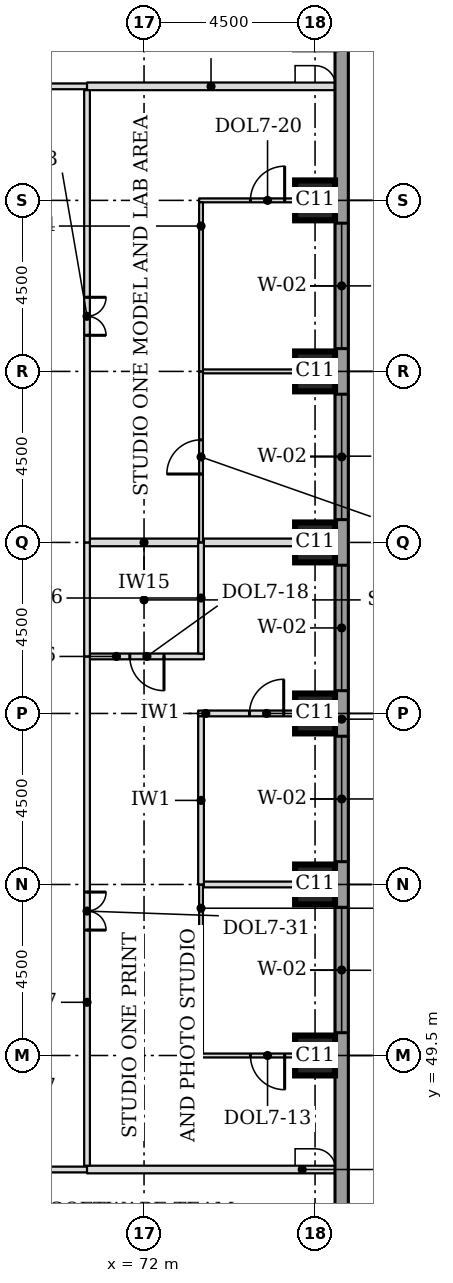
"""IFC4 building model, lengths in metres.
Left out: names, types, materials, properties, quantities, classifications, styles, units other than length and angle.
Written with IfcOpenShell. Run it as: python <this file> out.ifc"""

import sys

from ifc_helpers import new_model, si_unit, direction, frame, frame_2d, origin, origin_2d, place, context, subcontext, project, spatial, rectangle, extrude, element, fill, save


model = new_model("IFC4")
c1 = context("Model", 3, precision=1e-05, world=origin(), true_north=direction((0.0, 1.0)))
c2 = subcontext(c1, "Body", "Model", "MODEL_VIEW")
j1 = project(units=[si_unit("LENGTHUNIT", "METRE"), si_unit("PLANEANGLEUNIT", "RADIAN")], contexts=[c1])
p1 = place(None, origin())
s1 = spatial("IfcSite", under=j1, at=p1, CompositionType="ELEMENT")
p2 = place(p1, origin())
s2 = spatial("IfcBuilding", under=s1, at=p2, CompositionType="ELEMENT")
p3 = place(p2, frame((0.0, 0.0, 134.4)))
s3 = spatial("IfcBuildingStorey", under=s2, at=p3, CompositionType="ELEMENT", Elevation=134.4)
for number, where, z_axis, x_axis in (
    (1, (76.5, 49.5, 0.0), (0.0, 0.0, 1.0), (1.0, 0.0, 0.0)),
    (2, (76.5, 54.0, 0.0), (0.0, 0.0, 1.0), (1.0, 0.0, 0.0)),
    (3, (76.5, 58.5, 0.0), (0.0, 0.0, 1.0), (1.0, 0.0, 0.0)),
    (4, (76.5, 63.0, 0.0), (0.0, 0.0, 1.0), (1.0, 0.0, 0.0)),
    (5, (76.5, 67.5, 0.0), (0.0, 0.0, 1.0), (1.0, 0.0, 0.0)),
    (6, (76.5, 72.0, 0.0), (0.0, 0.0, 1.0), (1.0, 0.0, 0.0)),
):
    element("IfcColumn", number, at=place(p3, frame(where, z_axis=z_axis, x_axis=x_axis)), inside=s3, PredefinedType="COLUMN", context=c2, shape_type="SweptSolid", body=[
        extrude(rectangle(XDim=1.05, YDim=1.05, at=origin_2d()), origin(), (0.0, 0.0, 1.0), 3.7),
    ])
p4 = place(p3, frame((77.2, 44.638, 0.0), z_axis=(0.0, 0.0, 1.0), x_axis=(0.0, 1.0, 0.0)))
e7 = element("IfcWall", 7, at=p4, inside=s3, PredefinedType="STANDARD", context=c2, shape_type="SweptSolid", body=[
    extrude(rectangle(XDim=32.225, YDim=0.35, at=frame_2d((16.112, 0.0))), origin(), (0.0, 0.0, 1.0), 3.525),
])
p5 = place(p4, frame((5.462, 0.0, 0.9)))
e8 = element("IfcOpeningElement", 8, at=p5, cuts=e7, PredefinedType="OPENING", context=c2, shape_type="SweptSolid", body=[
    extrude(rectangle(XDim=3.3, YDim=1.9, at=frame_2d((1.65, 0.95))), frame((0.0, 0.185, 0.0), z_axis=(0.0, -1.0, 0.0), x_axis=(1.0, 0.0, 0.0)), (0.0, 0.0, 1.0), 0.37),
])
p6 = place(p4, frame((9.962, 0.0, 0.9)))
e9 = element("IfcOpeningElement", 9, at=p6, cuts=e7, PredefinedType="OPENING", context=c2, shape_type="SweptSolid", body=[
    extrude(rectangle(XDim=3.3, YDim=1.9, at=frame_2d((1.65, 0.95))), frame((0.0, 0.185, 0.0), z_axis=(0.0, -1.0, 0.0), x_axis=(1.0, 0.0, 0.0)), (0.0, 0.0, 1.0), 0.37),
])
p7 = place(p4, frame((14.462, 0.0, 0.9)))
e10 = element("IfcOpeningElement", 10, at=p7, cuts=e7, PredefinedType="OPENING", context=c2, shape_type="SweptSolid", body=[
    extrude(rectangle(XDim=3.3, YDim=1.9, at=frame_2d((1.65, 0.95))), frame((0.0, 0.185, 0.0), z_axis=(0.0, -1.0, 0.0), x_axis=(1.0, 0.0, 0.0)), (0.0, 0.0, 1.0), 0.37),
])
p8 = place(p4, frame((18.962, 0.0, 0.9)))
e11 = element("IfcOpeningElement", 11, at=p8, cuts=e7, PredefinedType="OPENING", context=c2, shape_type="SweptSolid", body=[
    extrude(rectangle(XDim=3.3, YDim=1.9, at=frame_2d((1.65, 0.95))), frame((0.0, 0.185, 0.0), z_axis=(0.0, -1.0, 0.0), x_axis=(1.0, 0.0, 0.0)), (0.0, 0.0, 1.0), 0.37),
])
p9 = place(p4, frame((23.462, 0.0, 0.9)))
e12 = element("IfcOpeningElement", 12, at=p9, cuts=e7, PredefinedType="OPENING", context=c2, shape_type="SweptSolid", body=[
    extrude(rectangle(XDim=3.3, YDim=1.9, at=frame_2d((1.65, 0.95))), frame((0.0, 0.185, 0.0), z_axis=(0.0, -1.0, 0.0), x_axis=(1.0, 0.0, 0.0)), (0.0, 0.0, 1.0), 0.37),
])
p10 = place(p3, frame((63.0, 46.5, 0.0), z_axis=(0.0, 0.0, 1.0), x_axis=(1.0, 0.0, 0.0)))
e13 = element("IfcWall", 13, at=p10, inside=s3, PredefinedType="PARTITIONING", context=c2, shape_type="SweptSolid", body=[
    extrude(rectangle(XDim=7.5, YDim=0.15, at=frame_2d((3.75, 0.0))), origin(), (0.0, 0.0, 1.0), 3.55),
])
p11 = place(p10, frame((3.25, 0.0, 0.0)))
e14 = element("IfcOpeningElement", 14, at=p11, cuts=e13, PredefinedType="OPENING", context=c2, shape_type="SweptSolid", body=[
    extrude(rectangle(XDim=1.0, YDim=2.1, at=frame_2d((0.5, 1.05))), frame((0.0, 0.085, 0.0), z_axis=(0.0, -1.0, 0.0), x_axis=(1.0, 0.0, 0.0)), (0.0, 0.0, 1.0), 0.17),
])
p12 = place(p3, frame((70.5, 46.5, 0.0), z_axis=(0.0, 0.0, 1.0), x_axis=(1.0, 0.0, 0.0)))
e15 = element("IfcWall", 15, at=p12, inside=s3, PredefinedType="PARTITIONING", context=c2, shape_type="SweptSolid", body=[
    extrude(rectangle(XDim=6.525, YDim=0.2, at=frame_2d((3.262, 0.0))), origin(), (0.0, 0.0, 1.0), 3.55),
])
p13 = place(p3, frame((73.45, 49.5, 0.0), z_axis=(0.0, 0.0, 1.0), x_axis=(1.0, 0.0, 0.0)))
e16 = element("IfcWall", 16, at=p13, inside=s3, PredefinedType="PARTITIONING", context=c2, shape_type="SweptSolid", body=[
    extrude(rectangle(XDim=3.575, YDim=0.1, at=frame_2d((1.788, 0.0))), origin(), (0.0, 0.0, 1.0), 3.55),
])
p14 = place(p13, frame((1.35, 0.0, 0.0)))
e17 = element("IfcOpeningElement", 17, at=p14, cuts=e16, PredefinedType="OPENING", context=c2, shape_type="SweptSolid", body=[
    extrude(rectangle(XDim=0.9, YDim=2.1, at=frame_2d((0.45, 1.05))), frame((0.0, 0.06, 0.0), z_axis=(0.0, -1.0, 0.0), x_axis=(1.0, 0.0, 0.0)), (0.0, 0.0, 1.0), 0.12),
])
p15 = place(p3, frame((73.575, 54.0, 0.0), z_axis=(0.0, 0.0, 1.0), x_axis=(1.0, 0.0, 0.0)))
e18 = element("IfcWall", 18, at=p15, inside=s3, PredefinedType="PARTITIONING", context=c2, shape_type="SweptSolid", body=[
    extrude(rectangle(XDim=3.45, YDim=0.15, at=frame_2d((1.725, 0.0))), origin(), (0.0, 0.0, 1.0), 3.55),
])
p16 = place(p3, frame((73.425, 58.5, 0.0), z_axis=(0.0, 0.0, 1.0), x_axis=(1.0, 0.0, 0.0)))
e19 = element("IfcWall", 19, at=p16, inside=s3, PredefinedType="PARTITIONING", context=c2, shape_type="SweptSolid", body=[
    extrude(rectangle(XDim=3.6, YDim=0.15, at=frame_2d((1.8, 0.0))), origin(), (0.0, 0.0, 1.0), 3.55),
])
p17 = place(p16, frame((1.35, 0.0, 0.0)))
e20 = element("IfcOpeningElement", 20, at=p17, cuts=e19, PredefinedType="OPENING", context=c2, shape_type="SweptSolid", body=[
    extrude(rectangle(XDim=0.9, YDim=2.1, at=frame_2d((0.45, 1.05))), frame((0.0, 0.085, 0.0), z_axis=(0.0, -1.0, 0.0), x_axis=(1.0, 0.0, 0.0)), (0.0, 0.0, 1.0), 0.17),
])
p18 = place(p3, frame((70.575, 60.0, 0.0), z_axis=(0.0, 0.0, 1.0), x_axis=(1.0, 0.0, 0.0)))
e21 = element("IfcWall", 21, at=p18, inside=s3, PredefinedType="PARTITIONING", context=c2, shape_type="SweptSolid", body=[
    extrude(rectangle(XDim=3.0, YDim=0.15, at=frame_2d((1.5, 0.0))), origin(), (0.0, 0.0, 1.0), 3.55),
])
p19 = place(p18, frame((1.05, 0.0, 0.0)))
e22 = element("IfcOpeningElement", 22, at=p19, cuts=e21, PredefinedType="OPENING", context=c2, shape_type="SweptSolid", body=[
    extrude(rectangle(XDim=0.9, YDim=2.1, at=frame_2d((0.45, 1.05))), frame((0.0, 0.085, 0.0), z_axis=(0.0, -1.0, 0.0), x_axis=(1.0, 0.0, 0.0)), (0.0, 0.0, 1.0), 0.17),
])
p20 = place(p3, frame((70.575, 63.0, 0.0), z_axis=(0.0, 0.0, 1.0), x_axis=(1.0, 0.0, 0.0)))
e23 = element("IfcWall", 23, at=p20, inside=s3, PredefinedType="PARTITIONING", context=c2, shape_type="SweptSolid", body=[
    extrude(rectangle(XDim=2.85, YDim=0.2, at=frame_2d((1.425, 0.0))), origin(), (0.0, 0.0, 1.0), 3.55),
])
p21 = place(p3, frame((73.575, 63.0, 0.0), z_axis=(0.0, 0.0, 1.0), x_axis=(1.0, 0.0, 0.0)))
e24 = element("IfcWall", 24, at=p21, inside=s3, PredefinedType="PARTITIONING", context=c2, shape_type="SweptSolid", body=[
    extrude(rectangle(XDim=3.45, YDim=0.2, at=frame_2d((1.725, 0.0))), origin(), (0.0, 0.0, 1.0), 3.55),
])
p22 = place(p3, frame((73.55, 67.5, 0.0), z_axis=(0.0, 0.0, 1.0), x_axis=(1.0, 0.0, 0.0)))
e25 = element("IfcWall", 25, at=p22, inside=s3, PredefinedType="PARTITIONING", context=c2, shape_type="SweptSolid", body=[
    extrude(rectangle(XDim=3.475, YDim=0.1, at=frame_2d((1.737, 0.0))), origin(), (0.0, 0.0, 1.0), 3.55),
])
p23 = place(p3, frame((73.45, 72.0, 0.0), z_axis=(0.0, 0.0, 1.0), x_axis=(1.0, 0.0, 0.0)))
e26 = element("IfcWall", 26, at=p23, inside=s3, PredefinedType="PARTITIONING", context=c2, shape_type="SweptSolid", body=[
    extrude(rectangle(XDim=3.575, YDim=0.1, at=frame_2d((1.788, 0.0))), origin(), (0.0, 0.0, 1.0), 3.55),
])
p24 = place(p23, frame((1.35, 0.0, 0.0)))
e27 = element("IfcOpeningElement", 27, at=p24, cuts=e26, PredefinedType="OPENING", context=c2, shape_type="SweptSolid", body=[
    extrude(rectangle(XDim=0.9, YDim=2.1, at=frame_2d((0.45, 1.05))), frame((0.0, 0.06, 0.0), z_axis=(0.0, -1.0, 0.0), x_axis=(1.0, 0.0, 0.0)), (0.0, 0.0, 1.0), 0.12),
])
p25 = place(p3, frame((58.5, 75.0, 0.0), z_axis=(0.0, 0.0, 1.0), x_axis=(1.0, 0.0, 0.0)))
e28 = element("IfcWall", 28, at=p25, inside=s3, PredefinedType="PARTITIONING", context=c2, shape_type="SweptSolid", body=[
    extrude(rectangle(XDim=12.0, YDim=0.15, at=frame_2d((6.0, 0.0))), origin(), (0.0, 0.0, 1.0), 3.55),
])
p26 = place(p25, frame((5.5, 0.0, 0.0)))
e29 = element("IfcOpeningElement", 29, at=p26, cuts=e28, PredefinedType="OPENING", context=c2, shape_type="SweptSolid", body=[
    extrude(rectangle(XDim=1.0, YDim=2.1, at=frame_2d((0.5, 1.05))), frame((0.0, 0.085, 0.0), z_axis=(0.0, -1.0, 0.0), x_axis=(1.0, 0.0, 0.0)), (0.0, 0.0, 1.0), 0.17),
])
p27 = place(p3, frame((70.5, 75.0, 0.0), z_axis=(0.0, 0.0, 1.0), x_axis=(1.0, 0.0, 0.0)))
e30 = element("IfcWall", 30, at=p27, inside=s3, PredefinedType="PARTITIONING", context=c2, shape_type="SweptSolid", body=[
    extrude(rectangle(XDim=6.525, YDim=0.2, at=frame_2d((3.262, 0.0))), origin(), (0.0, 0.0, 1.0), 3.55),
])
p28 = place(p3, frame((70.5, 46.6, 0.0), z_axis=(0.0, 0.0, 1.0), x_axis=(0.0, 1.0, 0.0)))
e31 = element("IfcWall", 31, at=p28, inside=s3, PredefinedType="PARTITIONING", context=c2, shape_type="SweptSolid", body=[
    extrude(rectangle(XDim=13.4, YDim=0.15, at=frame_2d((6.7, 0.0))), origin(), (0.0, 0.0, 1.0), 3.55),
])
p29 = place(p28, frame((6.2, 0.0, 0.0)))
e32 = element("IfcOpeningElement", 32, at=p29, cuts=e31, PredefinedType="OPENING", context=c2, shape_type="SweptSolid", body=[
    extrude(rectangle(XDim=1.0, YDim=2.1, at=frame_2d((0.5, 1.05))), frame((0.0, 0.085, 0.0), z_axis=(0.0, -1.0, 0.0), x_axis=(1.0, 0.0, 0.0)), (0.0, 0.0, 1.0), 0.17),
])
p30 = place(p3, frame((73.5, 49.55, 0.0), z_axis=(0.0, 0.0, 1.0), x_axis=(0.0, 1.0, 0.0)))
e33 = element("IfcWall", 33, at=p30, inside=s3, PredefinedType="PARTITIONING", context=c2, shape_type="SweptSolid", body=[
    extrude(rectangle(XDim=4.45, YDim=0.1, at=frame_2d((2.225, 0.0))), origin(), (0.0, 0.0, 1.0), 3.55),
])
p31 = place(p3, frame((73.5, 54.0, 0.0), z_axis=(0.0, 0.0, 1.0), x_axis=(0.0, 1.0, 0.0)))
e34 = element("IfcWall", 34, at=p31, inside=s3, PredefinedType="PARTITIONING", context=c2, shape_type="SweptSolid", body=[
    extrude(rectangle(XDim=4.425, YDim=0.15, at=frame_2d((2.212, 0.0))), origin(), (0.0, 0.0, 1.0), 3.55),
])
p32 = place(p3, frame((70.5, 60.0, 0.0), z_axis=(0.0, 0.0, 1.0), x_axis=(0.0, 1.0, 0.0)))
e35 = element("IfcWall", 35, at=p32, inside=s3, PredefinedType="PARTITIONING", context=c2, shape_type="SweptSolid", body=[
    extrude(rectangle(XDim=3.0, YDim=0.15, at=frame_2d((1.5, 0.0))), origin(), (0.0, 0.0, 1.0), 3.55),
])
p33 = place(p3, frame((73.5, 60.075, 0.0), z_axis=(0.0, 0.0, 1.0), x_axis=(0.0, 1.0, 0.0)))
e36 = element("IfcWall", 36, at=p33, inside=s3, PredefinedType="PARTITIONING", context=c2, shape_type="SweptSolid", body=[
    extrude(rectangle(XDim=2.925, YDim=0.15, at=frame_2d((1.462, 0.0))), origin(), (0.0, 0.0, 1.0), 3.55),
])
p34 = place(p3, frame((70.5, 63.0, 0.0), z_axis=(0.0, 0.0, 1.0), x_axis=(0.0, 1.0, 0.0)))
e37 = element("IfcWall", 37, at=p34, inside=s3, PredefinedType="PARTITIONING", context=c2, shape_type="SweptSolid", body=[
    extrude(rectangle(XDim=11.9, YDim=0.15, at=frame_2d((5.95, 0.0))), origin(), (0.0, 0.0, 1.0), 3.55),
])
p35 = place(p34, frame((5.45, 0.0, 0.0)))
e38 = element("IfcOpeningElement", 38, at=p35, cuts=e37, PredefinedType="OPENING", context=c2, shape_type="SweptSolid", body=[
    extrude(rectangle(XDim=1.0, YDim=2.1, at=frame_2d((0.5, 1.05))), frame((0.0, 0.085, 0.0), z_axis=(0.0, -1.0, 0.0), x_axis=(1.0, 0.0, 0.0)), (0.0, 0.0, 1.0), 0.17),
])
p36 = place(p3, frame((73.5, 63.0, 0.0), z_axis=(0.0, 0.0, 1.0), x_axis=(0.0, 1.0, 0.0)))
e39 = element("IfcWall", 39, at=p36, inside=s3, PredefinedType="PARTITIONING", context=c2, shape_type="SweptSolid", body=[
    extrude(rectangle(XDim=4.5, YDim=0.1, at=frame_2d((2.25, 0.0))), origin(), (0.0, 0.0, 1.0), 3.55),
])
p37 = place(p36, frame((1.8, 0.0, 0.0)))
e40 = element("IfcOpeningElement", 40, at=p37, cuts=e39, PredefinedType="OPENING", context=c2, shape_type="SweptSolid", body=[
    extrude(rectangle(XDim=0.9, YDim=2.1, at=frame_2d((0.45, 1.05))), frame((0.0, 0.06, 0.0), z_axis=(0.0, -1.0, 0.0), x_axis=(1.0, 0.0, 0.0)), (0.0, 0.0, 1.0), 0.12),
])
p38 = place(p3, frame((73.5, 67.5, 0.0), z_axis=(0.0, 0.0, 1.0), x_axis=(0.0, 1.0, 0.0)))
e41 = element("IfcWall", 41, at=p38, inside=s3, PredefinedType="PARTITIONING", context=c2, shape_type="SweptSolid", body=[
    extrude(rectangle(XDim=4.45, YDim=0.1, at=frame_2d((2.225, 0.0))), origin(), (0.0, 0.0, 1.0), 3.55),
])
p39 = place(p5, origin())
e42 = element("IfcWindow", 42, at=p39, inside=s3, PartitioningType="SINGLE_PANEL", PredefinedType="WINDOW", context=c2, shape_type="SweptSolid", body=[
    extrude(rectangle(XDim=3.3, YDim=1.9, at=frame_2d((1.65, 0.95))), frame((0.0, 0.085, 0.0), z_axis=(0.0, -1.0, 0.0), x_axis=(1.0, 0.0, 0.0)), (0.0, 0.0, 1.0), 0.06),
])
fill(e8, e42)
p40 = place(p6, origin())
e43 = element("IfcWindow", 43, at=p40, inside=s3, PartitioningType="SINGLE_PANEL", PredefinedType="WINDOW", context=c2, shape_type="SweptSolid", body=[
    extrude(rectangle(XDim=3.3, YDim=1.9, at=frame_2d((1.65, 0.95))), frame((0.0, 0.085, 0.0), z_axis=(0.0, -1.0, 0.0), x_axis=(1.0, 0.0, 0.0)), (0.0, 0.0, 1.0), 0.06),
])
fill(e9, e43)
p41 = place(p7, origin())
e44 = element("IfcWindow", 44, at=p41, inside=s3, PartitioningType="SINGLE_PANEL", PredefinedType="WINDOW", context=c2, shape_type="SweptSolid", body=[
    extrude(rectangle(XDim=3.3, YDim=1.9, at=frame_2d((1.65, 0.95))), frame((0.0, 0.085, 0.0), z_axis=(0.0, -1.0, 0.0), x_axis=(1.0, 0.0, 0.0)), (0.0, 0.0, 1.0), 0.06),
])
fill(e10, e44)
p42 = place(p8, origin())
e45 = element("IfcWindow", 45, at=p42, inside=s3, PartitioningType="SINGLE_PANEL", PredefinedType="WINDOW", context=c2, shape_type="SweptSolid", body=[
    extrude(rectangle(XDim=3.3, YDim=1.9, at=frame_2d((1.65, 0.95))), frame((0.0, 0.085, 0.0), z_axis=(0.0, -1.0, 0.0), x_axis=(1.0, 0.0, 0.0)), (0.0, 0.0, 1.0), 0.06),
])
fill(e11, e45)
p43 = place(p9, origin())
e46 = element("IfcWindow", 46, at=p43, inside=s3, PartitioningType="SINGLE_PANEL", PredefinedType="WINDOW", context=c2, shape_type="SweptSolid", body=[
    extrude(rectangle(XDim=3.3, YDim=1.9, at=frame_2d((1.65, 0.95))), frame((0.0, 0.085, 0.0), z_axis=(0.0, -1.0, 0.0), x_axis=(1.0, 0.0, 0.0)), (0.0, 0.0, 1.0), 0.06),
])
fill(e12, e46)
p44 = place(p29, frame((1.0, 0.0, 0.0), z_axis=(0.0, 0.0, 1.0), x_axis=(-1.0, 0.0, 0.0)))
e47 = element("IfcDoor", 47, at=p44, inside=s3, OperationType="DOUBLE_DOOR_SINGLE_SWING", PredefinedType="DOOR", context=c2, shape_type="SweptSolid", body=[
    extrude(rectangle(XDim=1.0, YDim=2.1, at=frame_2d((0.5, 1.05))), frame((0.0, 0.025, 0.0), z_axis=(0.0, -1.0, 0.0), x_axis=(1.0, 0.0, 0.0)), (0.0, 0.0, 1.0), 0.05),
])
fill(e32, e47)
p45 = place(p14, frame((0.9, 0.0, 0.0), z_axis=(0.0, 0.0, 1.0), x_axis=(-1.0, 0.0, 0.0)))
e48 = element("IfcDoor", 48, at=p45, inside=s3, OperationType="SINGLE_SWING_LEFT", PredefinedType="DOOR", context=c2, shape_type="SweptSolid", body=[
    extrude(rectangle(XDim=0.9, YDim=2.1, at=frame_2d((0.45, 1.05))), frame((0.0, 0.025, 0.0), z_axis=(0.0, -1.0, 0.0), x_axis=(1.0, 0.0, 0.0)), (0.0, 0.0, 1.0), 0.05),
])
fill(e17, e48)
p46 = place(p19, frame((0.9, 0.0, 0.0), z_axis=(0.0, 0.0, 1.0), x_axis=(-1.0, 0.0, 0.0)))
e49 = element("IfcDoor", 49, at=p46, inside=s3, OperationType="SINGLE_SWING_LEFT", PredefinedType="DOOR", context=c2, shape_type="SweptSolid", body=[
    extrude(rectangle(XDim=0.9, YDim=2.1, at=frame_2d((0.45, 1.05))), frame((0.0, 0.025, 0.0), z_axis=(0.0, -1.0, 0.0), x_axis=(1.0, 0.0, 0.0)), (0.0, 0.0, 1.0), 0.05),
])
fill(e22, e49)
p47 = place(p17, origin())
e50 = element("IfcDoor", 50, at=p47, inside=s3, OperationType="SINGLE_SWING_RIGHT", PredefinedType="DOOR", context=c2, shape_type="SweptSolid", body=[
    extrude(rectangle(XDim=0.9, YDim=2.1, at=frame_2d((0.45, 1.05))), frame((0.0, 0.025, 0.0), z_axis=(0.0, -1.0, 0.0), x_axis=(1.0, 0.0, 0.0)), (0.0, 0.0, 1.0), 0.05),
])
fill(e20, e50)
p48 = place(p35, frame((1.0, 0.0, 0.0), z_axis=(0.0, 0.0, 1.0), x_axis=(-1.0, 0.0, 0.0)))
e51 = element("IfcDoor", 51, at=p48, inside=s3, OperationType="DOUBLE_DOOR_SINGLE_SWING", PredefinedType="DOOR", context=c2, shape_type="SweptSolid", body=[
    extrude(rectangle(XDim=1.0, YDim=2.1, at=frame_2d((0.5, 1.05))), frame((0.0, 0.025, 0.0), z_axis=(0.0, -1.0, 0.0), x_axis=(1.0, 0.0, 0.0)), (0.0, 0.0, 1.0), 0.05),
])
fill(e38, e51)
p49 = place(p37, origin())
e52 = element("IfcDoor", 52, at=p49, inside=s3, OperationType="SINGLE_SWING_LEFT", PredefinedType="DOOR", context=c2, shape_type="SweptSolid", body=[
    extrude(rectangle(XDim=0.9, YDim=2.1, at=frame_2d((0.45, 1.05))), frame((0.0, 0.025, 0.0), z_axis=(0.0, -1.0, 0.0), x_axis=(1.0, 0.0, 0.0)), (0.0, 0.0, 1.0), 0.05),
])
fill(e40, e52)
p50 = place(p24, origin())
e53 = element("IfcDoor", 53, at=p50, inside=s3, OperationType="SINGLE_SWING_RIGHT", PredefinedType="DOOR", context=c2, shape_type="SweptSolid", body=[
    extrude(rectangle(XDim=0.9, YDim=2.1, at=frame_2d((0.45, 1.05))), frame((0.0, 0.025, 0.0), z_axis=(0.0, -1.0, 0.0), x_axis=(1.0, 0.0, 0.0)), (0.0, 0.0, 1.0), 0.05),
])
fill(e27, e53)
save(model, sys.argv[1])
